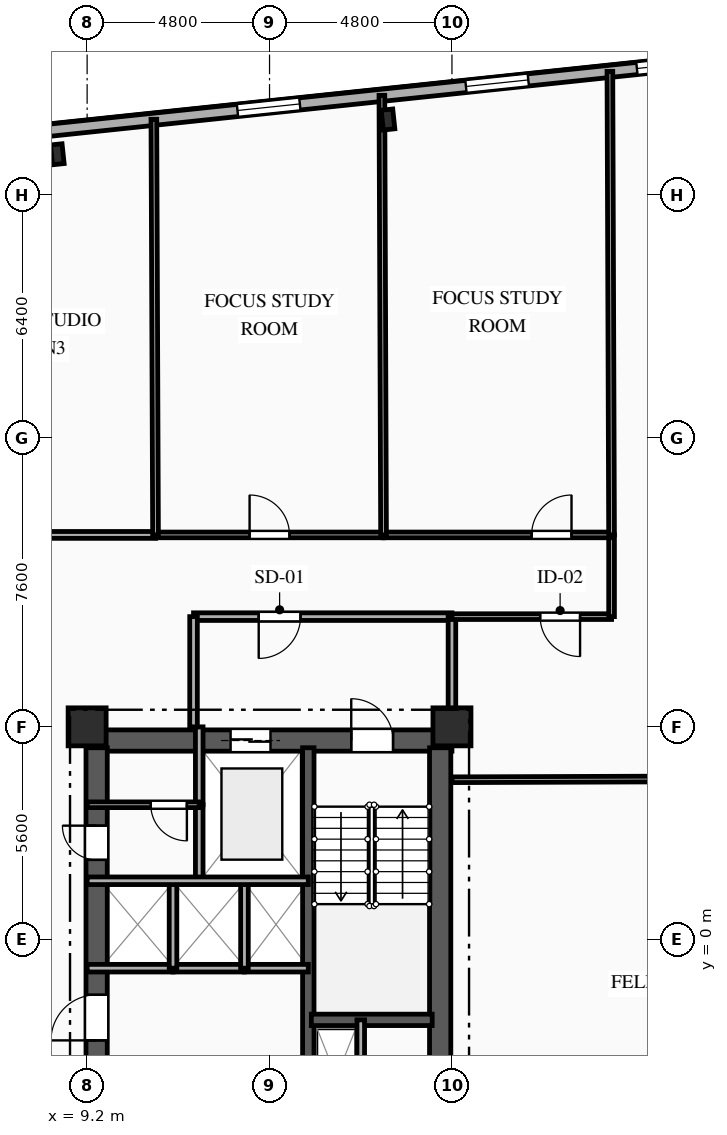
"""IFC4 building model, lengths in metres.
Left out: names, types, materials, properties, quantities, classifications, styles, units other than length and angle.
Written with IfcOpenShell. Run it as: python <this file> out.ifc"""

import sys

from ifc_helpers import new_model, si_unit, direction, frame, frame_2d, origin, origin_2d, place, context, subcontext, project, spatial, rectangle, i_section, extrude, element, fill, save


model = new_model("IFC4")
c1 = context("Model", 3, precision=1e-05, world=origin(), true_north=direction((0.0, 1.0)))
c2 = subcontext(c1, "Body", "Model", "MODEL_VIEW")
j1 = project(units=[si_unit("LENGTHUNIT", "METRE"), si_unit("PLANEANGLEUNIT", "RADIAN")], contexts=[c1])
p1 = place(None, origin())
s1 = spatial("IfcSite", under=j1, at=p1, CompositionType="ELEMENT")
p2 = place(p1, origin())
s2 = spatial("IfcBuilding", under=s1, at=p2, CompositionType="ELEMENT")
p3 = place(p2, frame((0.0, 0.0, 109.15)))
s3 = spatial("IfcBuildingStorey", under=s2, at=p3, CompositionType="ELEMENT", Elevation=109.15)
for number, where, z_axis, x_axis in (
    (1, (9.2, 5.6, 0.0), (0.0, 0.0, 1.0), (1.0, 0.0, 0.0)),
    (2, (18.8, 5.6, 0.0), (0.0, 0.0, 1.0), (1.0, 0.0, 0.0)),
):
    element("IfcColumn", number, at=place(p3, frame(where, z_axis=z_axis, x_axis=x_axis)), inside=s3, PredefinedType="COLUMN", context=c2, shape_type="SweptSolid", body=[
        extrude(rectangle(XDim=1.0, YDim=1.0, at=origin_2d()), origin(), (0.0, 0.0, 1.0), 3.35),
    ])
for number, where, z_axis, x_axis in (
    (3, (17.117, 21.58, 0.0), (0.0, 0.0, 1.0), (0.995, 0.105, 0.0)),
    (4, (8.415, 20.666, 0.0), (0.0, 0.0, 1.0), (0.995, 0.105, 0.0)),
):
    element("IfcColumn", number, at=place(p3, frame(where, z_axis=z_axis, x_axis=x_axis)), inside=s3, PredefinedType="COLUMN", context=c2, shape_type="SweptSolid", body=[
        extrude(i_section(OverallWidth=0.306, OverallDepth=0.524, WebThickness=0.021, FlangeThickness=0.04, FilletRadius=0.027, at=origin_2d()), origin(), (0.0, 0.0, 1.0), 3.35),
    ])
p4 = place(p3, frame((-27.107, 17.586, 0.0), z_axis=(0.0, 0.0, 1.0), x_axis=(0.994521628355, 0.104531003701, 0.0)))
e5 = element("IfcWall", 5, at=p4, inside=s3, PredefinedType="SOLIDWALL", context=c2, shape_type="SweptSolid", body=[
    extrude(rectangle(XDim=53.8, YDim=0.32, at=frame_2d((26.9, 0.0))), origin(), (0.0, 0.0, 1.0), 3.045),
])
p5 = place(p4, frame((1.532, 0.0, 0.85)))
e6 = element("IfcOpeningElement", 6, at=p5, cuts=e5, PredefinedType="OPENING", context=c2, shape_type="SweptSolid", body=[
    extrude(rectangle(XDim=1.5, YDim=1.85, at=frame_2d((0.75, 0.925))), frame((0.0, 0.17, 0.0), z_axis=(0.0, -1.0, 0.0), x_axis=(1.0, 0.0, 0.0)), (0.0, 0.0, 1.0), 0.34),
])
p6 = place(p4, frame((6.02, 0.0, 0.85)))
e7 = element("IfcOpeningElement", 7, at=p6, cuts=e5, PredefinedType="OPENING", context=c2, shape_type="SweptSolid", body=[
    extrude(rectangle(XDim=1.65, YDim=1.85, at=frame_2d((0.825, 0.925))), frame((0.0, 0.17, 0.0), z_axis=(0.0, -1.0, 0.0), x_axis=(1.0, 0.0, 0.0)), (0.0, 0.0, 1.0), 0.34),
])
p7 = place(p4, frame((11.584, 0.0, 0.85)))
e8 = element("IfcOpeningElement", 8, at=p7, cuts=e5, PredefinedType="OPENING", context=c2, shape_type="SweptSolid", body=[
    extrude(rectangle(XDim=1.65, YDim=1.85, at=frame_2d((0.825, 0.925))), frame((0.0, 0.17, 0.0), z_axis=(0.0, -1.0, 0.0), x_axis=(1.0, 0.0, 0.0)), (0.0, 0.0, 1.0), 0.34),
])
p8 = place(p4, frame((21.386, 0.0, 0.85)))
e9 = element("IfcOpeningElement", 9, at=p8, cuts=e5, PredefinedType="OPENING", context=c2, shape_type="SweptSolid", body=[
    extrude(rectangle(XDim=1.5, YDim=1.85, at=frame_2d((0.75, 0.925))), frame((0.0, 0.17, 0.0), z_axis=(0.0, -1.0, 0.0), x_axis=(1.0, 0.0, 0.0)), (0.0, 0.0, 1.0), 0.34),
])
p9 = place(p4, frame((31.404, 0.0, 0.85)))
e10 = element("IfcOpeningElement", 10, at=p9, cuts=e5, PredefinedType="OPENING", context=c2, shape_type="SweptSolid", body=[
    extrude(rectangle(XDim=2.2, YDim=1.85, at=frame_2d((1.1, 0.925))), frame((0.0, 0.17, 0.0), z_axis=(0.0, -1.0, 0.0), x_axis=(1.0, 0.0, 0.0)), (0.0, 0.0, 1.0), 0.34),
])
p10 = place(p4, frame((40.486, 0.0, 0.85)))
e11 = element("IfcOpeningElement", 11, at=p10, cuts=e5, PredefinedType="OPENING", context=c2, shape_type="SweptSolid", body=[
    extrude(rectangle(XDim=1.65, YDim=1.85, at=frame_2d((0.825, 0.925))), frame((0.0, 0.17, 0.0), z_axis=(0.0, -1.0, 0.0), x_axis=(1.0, 0.0, 0.0)), (0.0, 0.0, 1.0), 0.34),
])
p11 = place(p4, frame((46.53, 0.0, 0.85)))
e12 = element("IfcOpeningElement", 12, at=p11, cuts=e5, PredefinedType="OPENING", context=c2, shape_type="SweptSolid", body=[
    extrude(rectangle(XDim=1.65, YDim=1.85, at=frame_2d((0.825, 0.925))), frame((0.0, 0.17, 0.0), z_axis=(0.0, -1.0, 0.0), x_axis=(1.0, 0.0, 0.0)), (0.0, 0.0, 1.0), 0.34),
])
p12 = place(p4, frame((51.054, 0.0, 0.85)))
e13 = element("IfcOpeningElement", 13, at=p12, cuts=e5, PredefinedType="OPENING", context=c2, shape_type="SweptSolid", body=[
    extrude(rectangle(XDim=1.65, YDim=1.85, at=frame_2d((0.825, 0.925))), frame((0.0, 0.17, 0.0), z_axis=(0.0, -1.0, 0.0), x_axis=(1.0, 0.0, 0.0)), (0.0, 0.0, 1.0), 0.34),
])
p13 = place(p3, frame((9.2, 5.24, 0.0), z_axis=(0.0, 0.0, 1.0), x_axis=(1.0, 0.0, 0.0)))
e14 = element("IfcWall", 14, at=p13, inside=s3, PredefinedType="SHEAR", context=c2, shape_type="SweptSolid", body=[
    extrude(rectangle(XDim=9.6, YDim=0.56, at=frame_2d((4.8, 0.0))), origin(), (0.0, 0.0, 1.0), 3.045),
])
p14 = place(p13, frame((6.95, 0.0, 0.0)))
e15 = element("IfcOpeningElement", 15, at=p14, cuts=e14, PredefinedType="OPENING", context=c2, shape_type="SweptSolid", body=[
    extrude(rectangle(XDim=1.1, YDim=2.15, at=frame_2d((0.55, 1.075))), frame((0.0, 0.29, 0.0), z_axis=(0.0, -1.0, 0.0), x_axis=(1.0, 0.0, 0.0)), (0.0, 0.0, 1.0), 0.58),
])
p15 = place(p13, frame((3.775, 0.0, 0.0)))
e16 = element("IfcOpeningElement", 16, at=p15, cuts=e14, PredefinedType="OPENING", context=c2, shape_type="SweptSolid", body=[
    extrude(rectangle(XDim=1.05, YDim=2.1, at=frame_2d((0.525, 1.05))), frame((0.0, 0.29, 0.0), z_axis=(0.0, -1.0, 0.0), x_axis=(1.0, 0.0, 0.0)), (0.0, 0.0, 1.0), 0.58),
])
p16 = place(p3, frame((9.45, -5.05, 0.0), z_axis=(0.0, 0.0, 1.0), x_axis=(0.0, 1.0, 0.0)))
e17 = element("IfcWall", 17, at=p16, inside=s3, PredefinedType="SHEAR", context=c2, shape_type="SweptSolid", body=[
    extrude(rectangle(XDim=10.1, YDim=0.56, at=frame_2d((5.05, 0.0))), origin(), (0.0, 0.0, 1.0), 3.045),
])
p17 = place(p16, frame((7.15, 0.0, 0.0)))
e18 = element("IfcOpeningElement", 18, at=p17, cuts=e17, PredefinedType="OPENING", context=c2, shape_type="SweptSolid", body=[
    extrude(rectangle(XDim=0.9, YDim=2.1, at=frame_2d((0.45, 1.05))), frame((0.0, 0.29, 0.0), z_axis=(0.0, -1.0, 0.0), x_axis=(1.0, 0.0, 0.0)), (0.0, 0.0, 1.0), 0.58),
])
p18 = place(p16, frame((2.4, 0.0, 0.0)))
e19 = element("IfcOpeningElement", 19, at=p18, cuts=e17, PredefinedType="OPENING", context=c2, shape_type="SweptSolid", body=[
    extrude(rectangle(XDim=1.2, YDim=2.15, at=frame_2d((0.6, 1.075))), frame((0.0, 0.29, 0.0), z_axis=(0.0, -1.0, 0.0), x_axis=(1.0, 0.0, 0.0)), (0.0, 0.0, 1.0), 0.58),
])
p19 = place(p3, frame((18.49, -5.05, 0.0), z_axis=(0.0, 0.0, 1.0), x_axis=(0.0, 1.0, 0.0)))
e20 = element("IfcWall", 20, at=p19, inside=s3, PredefinedType="SHEAR", context=c2, shape_type="SweptSolid", body=[
    extrude(rectangle(XDim=10.1, YDim=0.56, at=frame_2d((5.05, 0.0))), origin(), (0.0, 0.0, 1.0), 3.045),
])
p20 = place(p3, frame((15.02, -5.05, 0.0), z_axis=(0.0, 0.0, 1.0), x_axis=(0.0, 1.0, 0.0)))
e21 = element("IfcWall", 21, at=p20, inside=s3, PredefinedType="SHEAR", context=c2, shape_type="SweptSolid", body=[
    extrude(rectangle(XDim=10.1, YDim=0.3, at=frame_2d((5.05, 0.0))), origin(), (0.0, 0.0, 1.0), 3.045),
])
p21 = place(p3, frame((15.1, -2.11, 0.0), z_axis=(0.0, 0.0, 1.0), x_axis=(1.0, 0.0, 0.0)))
e22 = element("IfcWall", 22, at=p21, inside=s3, PredefinedType="SHEAR", context=c2, shape_type="SweptSolid", body=[
    extrude(rectangle(XDim=3.18, YDim=0.3, at=frame_2d((1.59, 0.0))), origin(), (0.0, 0.0, 1.0), 3.045),
])
p22 = place(p3, frame((16.4, -2.11, 0.0), z_axis=(0.0, 0.0, 1.0), x_axis=(0.0, -1.0, 0.0)))
e23 = element("IfcWall", 23, at=p22, inside=s3, PredefinedType="PARTITIONING", context=c2, shape_type="SweptSolid", body=[
    extrude(rectangle(XDim=3.49, YDim=0.2, at=frame_2d((1.745, 0.0))), origin(), (0.0, 0.0, 1.0), 3.045),
])
p23 = place(p3, frame((12.15, 3.55, 0.0), z_axis=(0.0, 0.0, 1.0), x_axis=(0.0, -1.0, 0.0)))
e24 = element("IfcWall", 24, at=p23, inside=s3, PredefinedType="PARTITIONING", context=c2, shape_type="SweptSolid", body=[
    extrude(rectangle(XDim=2.0, YDim=0.2, at=frame_2d((1.0, 0.0))), origin(), (0.0, 0.0, 1.0), 3.045),
])
p24 = place(p3, frame((12.15, 5.6, 0.0), z_axis=(0.0, 0.0, 1.0), x_axis=(0.0, -1.0, 0.0)))
e25 = element("IfcWall", 25, at=p24, inside=s3, PredefinedType="PARTITIONING", context=c2, shape_type="SweptSolid", body=[
    extrude(rectangle(XDim=2.05, YDim=0.2, at=frame_2d((1.025, 0.0))), origin(), (0.0, 0.0, 1.0), 3.045),
])
p25 = place(p3, frame((18.8, 8.5, 0.0), z_axis=(0.0, 0.0, 1.0), x_axis=(-1.0, 0.0, 0.0)))
e26 = element("IfcWall", 26, at=p25, inside=s3, PredefinedType="PARTITIONING", context=c2, shape_type="SweptSolid", body=[
    extrude(rectangle(XDim=6.8, YDim=0.2, at=frame_2d((3.4, 0.0))), origin(), (0.0, 0.0, 1.0), 3.045),
])
p26 = place(p25, frame((3.985, 0.0, 0.0)))
e27 = element("IfcOpeningElement", 27, at=p26, cuts=e26, PredefinedType="OPENING", context=c2, shape_type="SweptSolid", body=[
    extrude(rectangle(XDim=1.1, YDim=2.15, at=frame_2d((0.55, 1.075))), frame((0.0, 0.11, 0.0), z_axis=(0.0, -1.0, 0.0), x_axis=(1.0, 0.0, 0.0)), (0.0, 0.0, 1.0), 0.22),
])
p27 = place(p3, frame((12.0, 8.5, 0.0), z_axis=(0.0, 0.0, 1.0), x_axis=(0.0, -1.0, 0.0)))
e28 = element("IfcWall", 28, at=p27, inside=s3, PredefinedType="PARTITIONING", context=c2, shape_type="SweptSolid", body=[
    extrude(rectangle(XDim=2.9, YDim=0.2, at=frame_2d((1.45, 0.0))), origin(), (0.0, 0.0, 1.0), 3.045),
])
p28 = place(p3, frame((18.8, 5.6, 0.0), z_axis=(0.0, 0.0, 1.0), x_axis=(0.0, 1.0, 0.0)))
e29 = element("IfcWall", 29, at=p28, inside=s3, PredefinedType="PARTITIONING", context=c2, shape_type="SweptSolid", body=[
    extrude(rectangle(XDim=2.9, YDim=0.2, at=frame_2d((1.45, 0.0))), origin(), (0.0, 0.0, 1.0), 2.53),
])
p29 = place(p3, frame((12.15, 3.55, 0.0), z_axis=(0.0, 0.0, 1.0), x_axis=(-1.0, 0.0, 0.0)))
e30 = element("IfcWall", 30, at=p29, inside=s3, PredefinedType="PARTITIONING", context=c2, shape_type="SweptSolid", body=[
    extrude(rectangle(XDim=2.95, YDim=0.15, at=frame_2d((1.475, 0.0))), origin(), (0.0, 0.0, 1.0), 3.045),
])
p30 = place(p29, frame((0.325, 0.0, 0.0)))
e31 = element("IfcOpeningElement", 31, at=p30, cuts=e30, PredefinedType="OPENING", context=c2, shape_type="SweptSolid", body=[
    extrude(rectangle(XDim=0.95, YDim=2.1, at=frame_2d((0.475, 1.05))), frame((0.0, 0.085, 0.0), z_axis=(0.0, -1.0, 0.0), x_axis=(1.0, 0.0, 0.0)), (0.0, 0.0, 1.0), 0.17),
])
p31 = place(p3, frame((11.46, -0.75, 0.0), z_axis=(0.0, 0.0, 1.0), x_axis=(-1.0, 0.0, 0.0)))
e32 = element("IfcWall", 32, at=p31, inside=s3, PredefinedType="PARTITIONING", context=c2, shape_type="SweptSolid", body=[
    extrude(rectangle(XDim=2.26, YDim=0.2, at=frame_2d((1.13, 0.0))), origin(), (0.0, 0.0, 1.0), 3.045),
])
p32 = place(p3, frame((13.34, -0.75, 0.0), z_axis=(0.0, 0.0, 1.0), x_axis=(-1.0, 0.0, 0.0)))
e33 = element("IfcWall", 33, at=p32, inside=s3, PredefinedType="PARTITIONING", context=c2, shape_type="SweptSolid", body=[
    extrude(rectangle(XDim=1.88, YDim=0.2, at=frame_2d((0.94, 0.0))), origin(), (0.0, 0.0, 1.0), 3.045),
])
p33 = place(p3, frame((15.02, -0.75, 0.0), z_axis=(0.0, 0.0, 1.0), x_axis=(-1.0, 0.0, 0.0)))
e34 = element("IfcWall", 34, at=p33, inside=s3, PredefinedType="PARTITIONING", context=c2, shape_type="SweptSolid", body=[
    extrude(rectangle(XDim=1.68, YDim=0.2, at=frame_2d((0.84, 0.0))), origin(), (0.0, 0.0, 1.0), 3.045),
])
for number, where, z_axis, x_axis in (
    (35, (11.46, -0.75, 0.0), (0.0, 0.0, 1.0), (0.0, 1.0, 0.0)),
    (36, (13.34, -0.75, 0.0), (0.0, 0.0, 1.0), (0.0, 1.0, 0.0)),
):
    element("IfcWall", number, at=place(p3, frame(where, z_axis=z_axis, x_axis=x_axis)), inside=s3, PredefinedType="PARTITIONING", context=c2, shape_type="SweptSolid", body=[
        extrude(rectangle(XDim=2.3, YDim=0.2, at=frame_2d((1.15, 0.0))), origin(), (0.0, 0.0, 1.0), 3.045),
    ])
p34 = place(p3, frame((23.0, 8.5, 0.0), z_axis=(0.0, 0.0, 1.0), x_axis=(-1.0, 0.0, 0.0)))
e37 = element("IfcWall", 37, at=p34, inside=s3, PredefinedType="PARTITIONING", context=c2, shape_type="SweptSolid", body=[
    extrude(rectangle(XDim=4.2, YDim=0.15, at=frame_2d((2.1, 0.0))), origin(), (0.0, 0.0, 1.0), 3.045),
])
p35 = place(p34, frame((0.829, 0.0, 0.0)))
e38 = element("IfcOpeningElement", 38, at=p35, cuts=e37, PredefinedType="OPENING", context=c2, shape_type="SweptSolid", body=[
    extrude(rectangle(XDim=1.05, YDim=2.15, at=frame_2d((0.525, 1.075))), frame((0.0, 0.085, 0.0), z_axis=(0.0, -1.0, 0.0), x_axis=(1.0, 0.0, 0.0)), (0.0, 0.0, 1.0), 0.17),
])
p36 = place(p3, frame((23.0, 10.65, 0.0), z_axis=(0.0, 0.0, 1.0), x_axis=(0.0, -1.0, 0.0)))
e39 = element("IfcWall", 39, at=p36, inside=s3, PredefinedType="PARTITIONING", context=c2, shape_type="SweptSolid", body=[
    extrude(rectangle(XDim=2.15, YDim=0.15, at=frame_2d((1.075, 0.0))), origin(), (0.0, 0.0, 1.0), 3.045),
])
p37 = place(p3, frame((1.95, 10.65, 0.0), z_axis=(0.0, 0.0, 1.0), x_axis=(1.0, 0.0, 0.0)))
e40 = element("IfcWall", 40, at=p37, inside=s3, PredefinedType="PARTITIONING", context=c2, shape_type="SweptSolid", body=[
    extrude(rectangle(XDim=9.05, YDim=0.18, at=frame_2d((4.525, 0.0))), origin(), (0.0, 0.0, 1.0), 3.045),
])
p38 = place(p37, frame((1.441, 0.0, 0.0)))
e41 = element("IfcOpeningElement", 41, at=p38, cuts=e40, PredefinedType="OPENING", context=c2, shape_type="SweptSolid", body=[
    extrude(rectangle(XDim=1.0, YDim=2.15, at=frame_2d((0.5, 1.075))), frame((0.0, 0.1, 0.0), z_axis=(0.0, -1.0, 0.0), x_axis=(1.0, 0.0, 0.0)), (0.0, 0.0, 1.0), 0.2),
])
p39 = place(p3, frame((11.0, 10.65, 0.0), z_axis=(0.0, 0.0, 1.0), x_axis=(1.0, 0.0, 0.0)))
e42 = element("IfcWall", 42, at=p39, inside=s3, PredefinedType="PARTITIONING", context=c2, shape_type="SweptSolid", body=[
    extrude(rectangle(XDim=6.0, YDim=0.15, at=frame_2d((3.0, 0.0))), origin(), (0.0, 0.0, 1.0), 3.045),
])
p40 = place(p39, frame((2.475, 0.0, 0.0)))
e43 = element("IfcOpeningElement", 43, at=p40, cuts=e42, PredefinedType="OPENING", context=c2, shape_type="SweptSolid", body=[
    extrude(rectangle(XDim=1.05, YDim=2.15, at=frame_2d((0.525, 1.075))), frame((0.0, 0.085, 0.0), z_axis=(0.0, -1.0, 0.0), x_axis=(1.0, 0.0, 0.0)), (0.0, 0.0, 1.0), 0.17),
])
p41 = place(p3, frame((17.0, 10.65, 0.0), z_axis=(0.0, 0.0, 1.0), x_axis=(1.0, 0.0, 0.0)))
e44 = element("IfcWall", 44, at=p41, inside=s3, PredefinedType="PARTITIONING", context=c2, shape_type="SweptSolid", body=[
    extrude(rectangle(XDim=6.0, YDim=0.15, at=frame_2d((3.0, 0.0))), origin(), (0.0, 0.0, 1.0), 3.045),
])
p42 = place(p41, frame((3.896, 0.0, 0.0)))
e45 = element("IfcOpeningElement", 45, at=p42, cuts=e44, PredefinedType="OPENING", context=c2, shape_type="SweptSolid", body=[
    extrude(rectangle(XDim=1.05, YDim=2.15, at=frame_2d((0.525, 1.075))), frame((0.0, 0.085, 0.0), z_axis=(0.0, -1.0, 0.0), x_axis=(1.0, 0.0, 0.0)), (0.0, 0.0, 1.0), 0.17),
])
p43 = place(p3, frame((18.8, 4.208, 0.0), z_axis=(0.0, 0.0, 1.0), x_axis=(0.9999942944, 0.003378042094, 0.0)))
e46 = element("IfcWall", 46, at=p43, inside=s3, PredefinedType="PARTITIONING", context=c2, shape_type="SweptSolid", body=[
    extrude(rectangle(XDim=13.009, YDim=0.15, at=frame_2d((6.504, 0.0))), origin(), (0.0, 0.0, 1.0), 3.045),
])
p44 = place(p3, frame((23.0, 10.65, 0.0), z_axis=(0.0, 0.0, 1.0), x_axis=(-0.0036027147, 0.999993510202, 0.0)))
e47 = element("IfcWall", 47, at=p44, inside=s3, PredefinedType="PARTITIONING", context=c2, shape_type="SweptSolid", body=[
    extrude(rectangle(XDim=12.198, YDim=0.15, at=frame_2d((6.099, 0.0))), origin(), (0.0, 0.0, 1.0), 3.045),
])
p45 = place(p3, frame((10.956, 21.586, 0.0), z_axis=(0.0, 0.0, 1.0), x_axis=(0.004018183473, -0.999991927068, 0.0)))
e48 = element("IfcWall", 48, at=p45, inside=s3, PredefinedType="PARTITIONING", context=c2, shape_type="SweptSolid", body=[
    extrude(rectangle(XDim=10.937, YDim=0.15, at=frame_2d((5.468, 0.0))), origin(), (0.0, 0.0, 1.0), 3.045),
])
p46 = place(p3, frame((16.956, 22.217, 0.0), z_axis=(0.0, 0.0, 1.0), x_axis=(0.003799124105, -0.999992783302, 0.0)))
e49 = element("IfcWall", 49, at=p46, inside=s3, PredefinedType="PARTITIONING", context=c2, shape_type="SweptSolid", body=[
    extrude(rectangle(XDim=11.567, YDim=0.15, at=frame_2d((5.784, 0.0))), origin(), (0.0, 0.0, 1.0), 2.53),
])
p47 = place(p3, frame((9.2, 1.55, 0.0), z_axis=(0.0, 0.0, 1.0), x_axis=(1.0, 0.0, 0.0)))
e50 = element("IfcWall", 50, at=p47, inside=s3, PredefinedType="PARTITIONING", context=c2, shape_type="SweptSolid", body=[
    extrude(rectangle(XDim=5.82, YDim=0.2, at=frame_2d((2.91, 0.0))), origin(), (0.0, 0.0, 1.0), 3.045),
])
p48 = place(p10, origin())
e51 = element("IfcWindow", 51, at=p48, inside=s3, PartitioningType="SINGLE_PANEL", PredefinedType="WINDOW", context=c2, shape_type="SweptSolid", body=[
    extrude(rectangle(XDim=1.65, YDim=1.85, at=frame_2d((0.825, 0.925))), frame((0.0, 0.03, 0.0), z_axis=(0.0, -1.0, 0.0), x_axis=(1.0, 0.0, 0.0)), (0.0, 0.0, 1.0), 0.06),
])
fill(e11, e51)
p49 = place(p11, origin())
e52 = element("IfcWindow", 52, at=p49, inside=s3, PartitioningType="SINGLE_PANEL", PredefinedType="WINDOW", context=c2, shape_type="SweptSolid", body=[
    extrude(rectangle(XDim=1.65, YDim=1.85, at=frame_2d((0.825, 0.925))), frame((0.0, 0.03, 0.0), z_axis=(0.0, -1.0, 0.0), x_axis=(1.0, 0.0, 0.0)), (0.0, 0.0, 1.0), 0.06),
])
fill(e12, e52)
p50 = place(p12, origin())
e53 = element("IfcWindow", 53, at=p50, inside=s3, PartitioningType="SINGLE_PANEL", PredefinedType="WINDOW", context=c2, shape_type="SweptSolid", body=[
    extrude(rectangle(XDim=1.65, YDim=1.85, at=frame_2d((0.825, 0.925))), frame((0.0, 0.03, 0.0), z_axis=(0.0, -1.0, 0.0), x_axis=(1.0, 0.0, 0.0)), (0.0, 0.0, 1.0), 0.06),
])
fill(e13, e53)
p51 = place(p14, origin())
e54 = element("IfcDoor", 54, at=p51, inside=s3, OperationType="SINGLE_SWING_LEFT", PredefinedType="DOOR", context=c2, shape_type="SweptSolid", body=[
    extrude(rectangle(XDim=1.1, YDim=2.15, at=frame_2d((0.55, 1.075))), frame((0.0, 0.025, 0.0), z_axis=(0.0, -1.0, 0.0), x_axis=(1.0, 0.0, 0.0)), (0.0, 0.0, 1.0), 0.05),
])
fill(e15, e54)
p52 = place(p15, origin())
e55 = element("IfcDoor", 55, at=p52, inside=s3, OperationType="DOUBLE_DOOR_SLIDING", PredefinedType="DOOR", context=c2, shape_type="SweptSolid", body=[
    extrude(rectangle(XDim=1.05, YDim=2.1, at=frame_2d((0.525, 1.05))), frame((0.0, 0.025, 0.0), z_axis=(0.0, -1.0, 0.0), x_axis=(1.0, 0.0, 0.0)), (0.0, 0.0, 1.0), 0.05),
])
fill(e16, e55)
p53 = place(p26, origin())
e56 = element("IfcDoor", 56, at=p53, inside=s3, OperationType="SINGLE_SWING_RIGHT", PredefinedType="DOOR", context=c2, shape_type="SweptSolid", body=[
    extrude(rectangle(XDim=1.1, YDim=2.15, at=frame_2d((0.55, 1.075))), frame((0.0, 0.025, 0.0), z_axis=(0.0, -1.0, 0.0), x_axis=(1.0, 0.0, 0.0)), (0.0, 0.0, 1.0), 0.05),
])
fill(e27, e56)
p54 = place(p30, origin())
e57 = element("IfcDoor", 57, at=p54, inside=s3, OperationType="SINGLE_SWING_LEFT", PredefinedType="DOOR", context=c2, shape_type="SweptSolid", body=[
    extrude(rectangle(XDim=0.95, YDim=2.1, at=frame_2d((0.475, 1.05))), frame((0.0, 0.025, 0.0), z_axis=(0.0, -1.0, 0.0), x_axis=(1.0, 0.0, 0.0)), (0.0, 0.0, 1.0), 0.05),
])
fill(e31, e57)
p55 = place(p17, origin())
e58 = element("IfcDoor", 58, at=p55, inside=s3, OperationType="SINGLE_SWING_RIGHT", PredefinedType="DOOR", context=c2, shape_type="SweptSolid", body=[
    extrude(rectangle(XDim=0.9, YDim=2.1, at=frame_2d((0.45, 1.05))), frame((0.0, 0.025, 0.0), z_axis=(0.0, -1.0, 0.0), x_axis=(1.0, 0.0, 0.0)), (0.0, 0.0, 1.0), 0.05),
])
fill(e18, e58)
p56 = place(p18, origin())
e59 = element("IfcDoor", 59, at=p56, inside=s3, OperationType="SINGLE_SWING_LEFT", PredefinedType="DOOR", context=c2, shape_type="SweptSolid", body=[
    extrude(rectangle(XDim=1.2, YDim=2.15, at=frame_2d((0.6, 1.075))), frame((0.0, 0.025, 0.0), z_axis=(0.0, -1.0, 0.0), x_axis=(1.0, 0.0, 0.0)), (0.0, 0.0, 1.0), 0.05),
])
fill(e19, e59)
p57 = place(p35, origin())
e60 = element("IfcDoor", 60, at=p57, inside=s3, OperationType="SINGLE_SWING_LEFT", PredefinedType="DOOR", context=c2, shape_type="SweptSolid", body=[
    extrude(rectangle(XDim=1.05, YDim=2.15, at=frame_2d((0.525, 1.075))), frame((0.0, 0.025, 0.0), z_axis=(0.0, -1.0, 0.0), x_axis=(1.0, 0.0, 0.0)), (0.0, 0.0, 1.0), 0.05),
])
fill(e38, e60)
p58 = place(p40, origin())
e61 = element("IfcDoor", 61, at=p58, inside=s3, OperationType="SINGLE_SWING_LEFT", PredefinedType="DOOR", context=c2, shape_type="SweptSolid", body=[
    extrude(rectangle(XDim=1.05, YDim=2.15, at=frame_2d((0.525, 1.075))), frame((0.0, 0.025, 0.0), z_axis=(0.0, -1.0, 0.0), x_axis=(1.0, 0.0, 0.0)), (0.0, 0.0, 1.0), 0.05),
])
fill(e43, e61)
p59 = place(p42, origin())
e62 = element("IfcDoor", 62, at=p59, inside=s3, OperationType="SINGLE_SWING_RIGHT", PredefinedType="DOOR", context=c2, shape_type="SweptSolid", body=[
    extrude(rectangle(XDim=1.05, YDim=2.15, at=frame_2d((0.525, 1.075))), frame((0.0, 0.025, 0.0), z_axis=(0.0, -1.0, 0.0), x_axis=(1.0, 0.0, 0.0)), (0.0, 0.0, 1.0), 0.05),
])
fill(e45, e62)
save(model, sys.argv[1])
